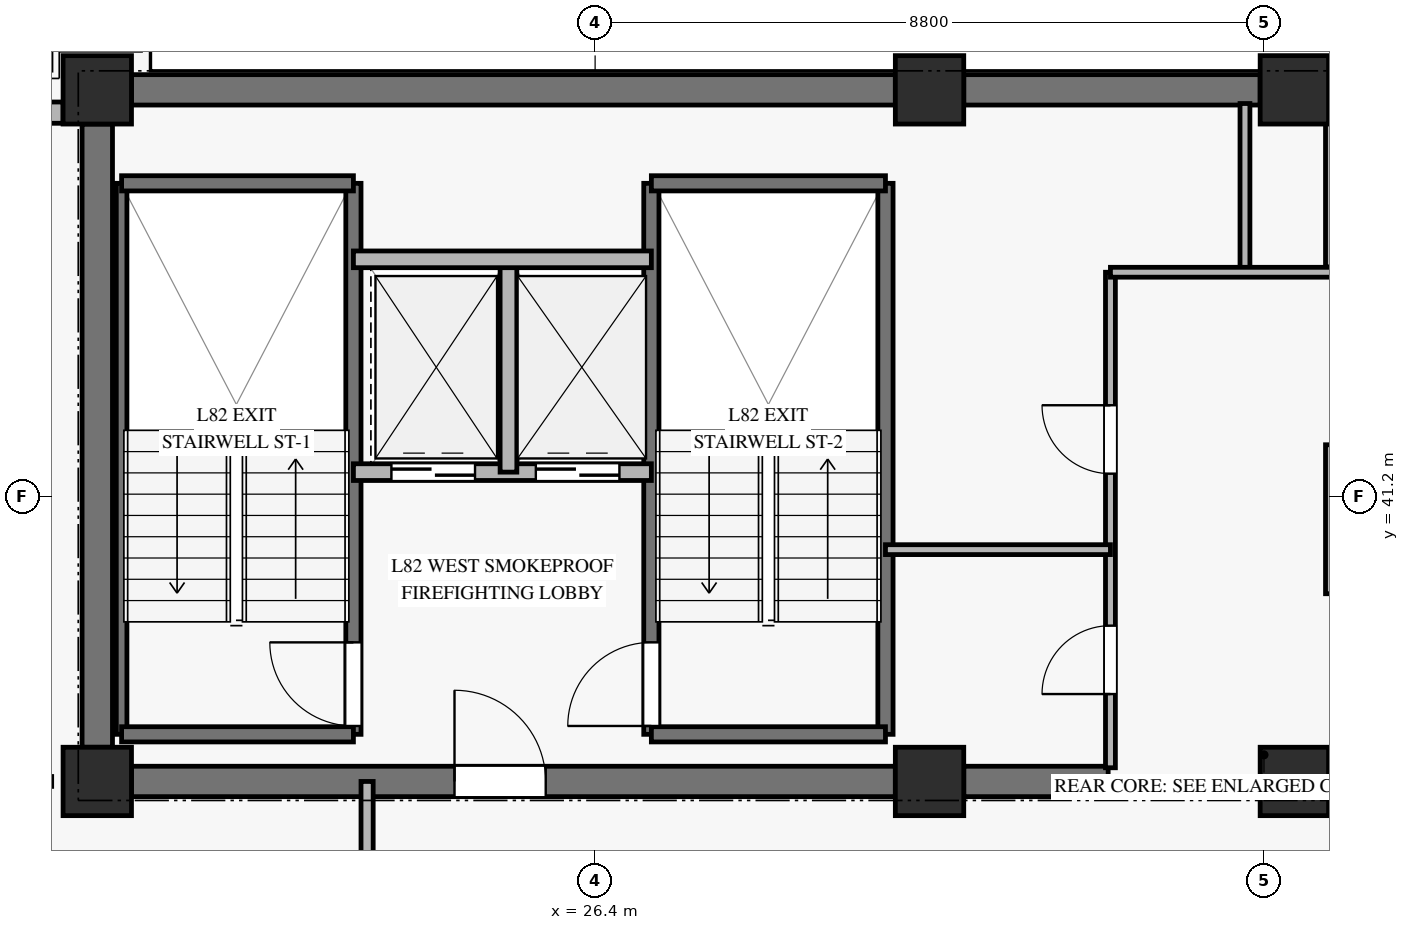
"""IFC4 building model, lengths in metres.
Left out: names, types, materials, properties, quantities, classifications, styles, units other than length and angle.
Written with IfcOpenShell. Run it as: python <this file> out.ifc"""

import sys

from ifc_helpers import new_model, si_unit, direction, frame, frame_2d, origin, origin_2d, place, context, subcontext, project, spatial, rectangle, extrude, source, transform, mapped, element, fill, save


model = new_model("IFC4")
c1 = context("Model", 3, precision=1e-05, world=origin(), true_north=direction((0.0, 1.0)))
c2 = subcontext(c1, "Body", "Model", "MODEL_VIEW")
j1 = project(units=[si_unit("LENGTHUNIT", "METRE"), si_unit("PLANEANGLEUNIT", "RADIAN")], contexts=[c1])
p1 = place(None, origin())
s1 = spatial("IfcSite", under=j1, at=p1, CompositionType="ELEMENT")
p2 = place(p1, origin())
s2 = spatial("IfcBuilding", under=s1, at=p2, CompositionType="ELEMENT")
p3 = place(p2, frame((0.0, 0.0, 317.6)))
s3 = spatial("IfcBuildingStorey", under=s2, at=p3, CompositionType="ELEMENT", Elevation=317.6)
m1 = source(origin(), c2, "Body", "SweptSolid", [
    extrude(rectangle(XDim=0.9, YDim=0.9, at=origin_2d()), origin(), (0.0, 0.0, 1.0), 3.185),
])
for number, where, z_axis, x_axis in (
    (1, (19.85, 37.45, 0.0), (0.0, 0.0, 1.0), (1.0, 0.0, 0.0)),
    (2, (19.85, 46.55, 0.0), (0.0, 0.0, 1.0), (1.0, 0.0, 0.0)),
    (3, (30.8, 37.45, 0.0), (0.0, 0.0, 1.0), (1.0, 0.0, 0.0)),
    (4, (30.8, 46.55, 0.0), (0.0, 0.0, 1.0), (1.0, 0.0, 0.0)),
    (5, (35.6, 37.45, 0.0), (0.0, 0.0, 1.0), (1.0, 0.0, 0.0)),
    (6, (35.6, 46.55, 0.0), (0.0, 0.0, 1.0), (1.0, 0.0, 0.0)),
):
    element("IfcColumn", number, at=place(p3, frame(where, z_axis=z_axis, x_axis=x_axis)), inside=s3, PredefinedType="PILASTER", context=c2, shape_type="MappedRepresentation", body=[
        mapped(m1, transform((0.0, 0.0, 0.0), x_axis=(1.0, 0.0, 0.0), y_axis=(0.0, 1.0, 0.0), z_axis=(0.0, 0.0, 1.0), scale=1.0)),
    ])
p4 = place(p3, frame((20.3, 46.55, 0.0), z_axis=(0.0, 0.0, 1.0), x_axis=(1.0, 0.0, 0.0)))
e7 = element("IfcWall", 7, at=p4, inside=s3, PredefinedType="SHEAR", context=c2, shape_type="SweptSolid", body=[
    extrude(rectangle(XDim=10.05, YDim=0.4, at=frame_2d((5.025, 0.0))), origin(), (0.0, 0.0, 1.0), 3.185),
])
p5 = place(p3, frame((31.25, 46.55, 0.0), z_axis=(0.0, 0.0, 1.0), x_axis=(1.0, 0.0, 0.0)))
e8 = element("IfcWall", 8, at=p5, inside=s3, PredefinedType="SHEAR", context=c2, shape_type="SweptSolid", body=[
    extrude(rectangle(XDim=3.9, YDim=0.4, at=frame_2d((1.95, 0.0))), origin(), (0.0, 0.0, 1.0), 3.185),
])
p6 = place(p3, frame((36.05, 46.55, 0.0), z_axis=(0.0, 0.0, 1.0), x_axis=(1.0, 0.0, 0.0)))
e9 = element("IfcWall", 9, at=p6, inside=s3, PredefinedType="SHEAR", context=c2, shape_type="SweptSolid", body=[
    extrude(rectangle(XDim=7.8, YDim=0.4, at=frame_2d((3.9, 0.0))), origin(), (0.0, 0.0, 1.0), 3.185),
])
p7 = place(p3, frame((20.3, 37.45, 0.0), z_axis=(0.0, 0.0, 1.0), x_axis=(1.0, 0.0, 0.0)))
e10 = element("IfcWall", 10, at=p7, inside=s3, PredefinedType="SHEAR", context=c2, shape_type="SweptSolid", body=[
    extrude(rectangle(XDim=10.05, YDim=0.4, at=frame_2d((5.025, 0.0))), origin(), (0.0, 0.0, 1.0), 3.185),
])
p8 = place(p7, frame((4.25, 0.0, 0.0)))
e11 = element("IfcOpeningElement", 11, at=p8, cuts=e10, PredefinedType="OPENING", context=c2, shape_type="SweptSolid", body=[
    extrude(rectangle(XDim=1.2, YDim=2.15, at=frame_2d((0.6, 1.075))), frame((0.0, 0.21, 0.0), z_axis=(0.0, -1.0, 0.0), x_axis=(1.0, 0.0, 0.0)), (0.0, 0.0, 1.0), 0.42),
])
p9 = place(p3, frame((31.25, 37.45, 0.0), z_axis=(0.0, 0.0, 1.0), x_axis=(1.0, 0.0, 0.0)))
e12 = element("IfcWall", 12, at=p9, inside=s3, PredefinedType="SHEAR", context=c2, shape_type="SweptSolid", body=[
    extrude(rectangle(XDim=1.9, YDim=0.4, at=frame_2d((0.95, 0.0))), origin(), (0.0, 0.0, 1.0), 3.185),
])
p10 = place(p3, frame((36.05, 37.45, 0.0), z_axis=(0.0, 0.0, 1.0), x_axis=(1.0, 0.0, 0.0)))
e13 = element("IfcWall", 13, at=p10, inside=s3, PredefinedType="SHEAR", context=c2, shape_type="SweptSolid", body=[
    extrude(rectangle(XDim=7.8, YDim=0.4, at=frame_2d((3.9, 0.0))), origin(), (0.0, 0.0, 1.0), 3.185),
])
p11 = place(p3, frame((19.85, 37.9, 0.0), z_axis=(0.0, 0.0, 1.0), x_axis=(0.0, 1.0, 0.0)))
e14 = element("IfcWall", 14, at=p11, inside=s3, PredefinedType="SHEAR", context=c2, shape_type="SweptSolid", body=[
    extrude(rectangle(XDim=8.2, YDim=0.4, at=frame_2d((4.1, 0.0))), origin(), (0.0, 0.0, 1.0), 3.185),
])
p12 = place(p3, frame((13.393, 46.25, 0.0), z_axis=(0.0, 0.0, 1.0), x_axis=(1.0, 0.0, 0.0)))
e15 = element("IfcWall", 15, at=p12, inside=s3, PredefinedType="SOLIDWALL", context=c2, shape_type="SweptSolid", body=[
    extrude(rectangle(XDim=6.007, YDim=0.28, at=frame_2d((3.003, 0.0))), origin(), (0.0, 0.0, 1.0), 2.815),
])
p13 = place(p12, frame((2.203, 0.0, 0.45)))
e16 = element("IfcOpeningElement", 16, at=p13, cuts=e15, PredefinedType="OPENING", context=c2, shape_type="SweptSolid", body=[
    extrude(rectangle(XDim=1.6, YDim=2.0, at=frame_2d((0.8, 1.0))), frame((0.0, 0.15, 0.0), z_axis=(0.0, -1.0, 0.0), x_axis=(1.0, 0.0, 0.0)), (0.0, 0.0, 1.0), 0.3),
])
p14 = place(p3, frame((20.17, 38.07, 0.0), z_axis=(0.0, 0.0, 1.0), x_axis=(0.0, 1.0, 0.0)))
e17 = element("IfcWall", 17, at=p14, inside=s3, PredefinedType="SOLIDWALL", context=c2, shape_type="SweptSolid", body=[
    extrude(rectangle(XDim=7.25, YDim=0.14, at=frame_2d((3.625, 0.0))), origin(), (0.0, 0.0, 1.0), 3.4),
])
p15 = place(p3, frame((23.22, 38.07, 0.0), z_axis=(0.0, 0.0, 1.0), x_axis=(0.0, 1.0, 0.0)))
e18 = element("IfcWall", 18, at=p15, inside=s3, PredefinedType="SOLIDWALL", context=c2, shape_type="SweptSolid", body=[
    extrude(rectangle(XDim=7.25, YDim=0.2, at=frame_2d((3.625, 0.0))), origin(), (0.0, 0.0, 1.0), 3.4),
])
p16 = place(p15, frame((0.11, 0.0, 0.0)))
e19 = element("IfcOpeningElement", 19, at=p16, cuts=e18, PredefinedType="OPENING", context=c2, shape_type="SweptSolid", body=[
    extrude(rectangle(XDim=1.1, YDim=2.15, at=frame_2d((0.55, 1.075))), frame((0.0, 0.11, 0.0), z_axis=(0.0, -1.0, 0.0), x_axis=(1.0, 0.0, 0.0)), (0.0, 0.0, 1.0), 0.22),
])
for number, where, z_axis, x_axis in (
    (20, (20.17, 45.32, 0.0), (0.0, 0.0, 1.0), (1.0, 0.0, 0.0)),
    (21, (20.17, 38.07, 0.0), (0.0, 0.0, 1.0), (1.0, 0.0, 0.0)),
):
    element("IfcWall", number, at=place(p3, frame(where, z_axis=z_axis, x_axis=x_axis)), inside=s3, PredefinedType="SOLIDWALL", context=c2, shape_type="SweptSolid", body=[
        extrude(rectangle(XDim=3.05, YDim=0.2, at=frame_2d((1.525, 0.0))), origin(), (0.0, 0.0, 1.0), 3.4),
    ])
p17 = place(p3, frame((27.14, 38.07, 0.0), z_axis=(0.0, 0.0, 1.0), x_axis=(0.0, 1.0, 0.0)))
e22 = element("IfcWall", 22, at=p17, inside=s3, PredefinedType="SOLIDWALL", context=c2, shape_type="SweptSolid", body=[
    extrude(rectangle(XDim=7.25, YDim=0.2, at=frame_2d((3.625, 0.0))), origin(), (0.0, 0.0, 1.0), 3.4),
])
p18 = place(p17, frame((0.11, 0.0, 0.0)))
e23 = element("IfcOpeningElement", 23, at=p18, cuts=e22, PredefinedType="OPENING", context=c2, shape_type="SweptSolid", body=[
    extrude(rectangle(XDim=1.1, YDim=2.15, at=frame_2d((0.55, 1.075))), frame((0.0, 0.11, 0.0), z_axis=(0.0, -1.0, 0.0), x_axis=(1.0, 0.0, 0.0)), (0.0, 0.0, 1.0), 0.22),
])
p19 = place(p3, frame((30.22, 38.07, 0.0), z_axis=(0.0, 0.0, 1.0), x_axis=(0.0, 1.0, 0.0)))
e24 = element("IfcWall", 24, at=p19, inside=s3, PredefinedType="SOLIDWALL", context=c2, shape_type="SweptSolid", body=[
    extrude(rectangle(XDim=7.25, YDim=0.2, at=frame_2d((3.625, 0.0))), origin(), (0.0, 0.0, 1.0), 3.4),
])
for number, where, z_axis, x_axis in (
    (25, (27.14, 45.32, 0.0), (0.0, 0.0, 1.0), (1.0, 0.0, 0.0)),
    (26, (27.14, 38.07, 0.0), (0.0, 0.0, 1.0), (1.0, 0.0, 0.0)),
):
    element("IfcWall", number, at=place(p3, frame(where, z_axis=z_axis, x_axis=x_axis)), inside=s3, PredefinedType="SOLIDWALL", context=c2, shape_type="SweptSolid", body=[
        extrude(rectangle(XDim=3.08, YDim=0.2, at=frame_2d((1.54, 0.0))), origin(), (0.0, 0.0, 1.0), 3.4),
    ])
p20 = place(p3, frame((23.22, 41.52, 0.0), z_axis=(0.0, 0.0, 1.0), x_axis=(1.0, 0.0, 0.0)))
e27 = element("IfcWall", 27, at=p20, inside=s3, PredefinedType="SOLIDWALL", context=c2, shape_type="SweptSolid", body=[
    extrude(rectangle(XDim=3.92, YDim=0.22, at=frame_2d((1.96, 0.0))), origin(), (0.0, 0.0, 1.0), 3.185),
])
p21 = place(p20, frame((0.5, 0.0, 0.0)))
e28 = element("IfcOpeningElement", 28, at=p21, cuts=e27, PredefinedType="OPENING", context=c2, shape_type="SweptSolid", body=[
    extrude(rectangle(XDim=1.1, YDim=2.2, at=frame_2d((0.55, 1.1))), frame((0.0, 0.12, 0.0), z_axis=(0.0, -1.0, 0.0), x_axis=(1.0, 0.0, 0.0)), (0.0, 0.0, 1.0), 0.24),
])
p22 = place(p20, frame((2.4, 0.0, 0.0)))
e29 = element("IfcOpeningElement", 29, at=p22, cuts=e27, PredefinedType="OPENING", context=c2, shape_type="SweptSolid", body=[
    extrude(rectangle(XDim=1.1, YDim=2.2, at=frame_2d((0.55, 1.1))), frame((0.0, 0.12, 0.0), z_axis=(0.0, -1.0, 0.0), x_axis=(1.0, 0.0, 0.0)), (0.0, 0.0, 1.0), 0.24),
])
p23 = place(p3, frame((25.26, 41.52, 0.0), z_axis=(0.0, 0.0, 1.0), x_axis=(0.0, 1.0, 0.0)))
e30 = element("IfcWall", 30, at=p23, inside=s3, PredefinedType="SOLIDWALL", context=c2, shape_type="SweptSolid", body=[
    extrude(rectangle(XDim=2.8, YDim=0.22, at=frame_2d((1.4, 0.0))), origin(), (0.0, 0.0, 1.0), 3.185),
])
p24 = place(p3, frame((23.22, 44.32, 0.0), z_axis=(0.0, 0.0, 1.0), x_axis=(1.0, 0.0, 0.0)))
e31 = element("IfcWall", 31, at=p24, inside=s3, PredefinedType="SOLIDWALL", context=c2, shape_type="SweptSolid", body=[
    extrude(rectangle(XDim=3.92, YDim=0.22, at=frame_2d((1.96, 0.0))), origin(), (0.0, 0.0, 1.0), 3.185),
])
p25 = place(p3, frame((36.12, 39.92, 0.0), z_axis=(0.0, 0.0, 1.0), x_axis=(0.0, 1.0, 0.0)))
e32 = element("IfcWall", 32, at=p25, inside=s3, PredefinedType="SOLIDWALL", context=c2, shape_type="SweptSolid", body=[
    extrude(rectangle(XDim=1.96, YDim=0.22, at=frame_2d((0.98, 0.0))), origin(), (0.0, 0.0, 1.0), 3.185),
])
p26 = place(p3, frame((36.12, 44.22, 0.0), z_axis=(0.0, 0.0, 1.0), x_axis=(0.0, 1.0, 0.0)))
e33 = element("IfcWall", 33, at=p26, inside=s3, PredefinedType="SOLIDWALL", context=c2, shape_type="SweptSolid", body=[
    extrude(rectangle(XDim=2.15, YDim=0.22, at=frame_2d((1.075, 0.0))), origin(), (0.0, 0.0, 1.0), 3.185),
])
p27 = place(p3, frame((33.18, 37.63, 0.0), z_axis=(0.0, 0.0, 1.0), x_axis=(0.0, 1.0, 0.0)))
e34 = element("IfcWall", 34, at=p27, inside=s3, PredefinedType="PARTITIONING", context=c2, shape_type="SweptSolid", body=[
    extrude(rectangle(XDim=6.52, YDim=0.13, at=frame_2d((3.26, 0.0))), origin(), (0.0, 0.0, 1.0), 2.27),
])
p28 = place(p27, frame((0.97, 0.0, 0.0)))
e35 = element("IfcOpeningElement", 35, at=p28, cuts=e34, PredefinedType="OPENING", context=c2, shape_type="SweptSolid", body=[
    extrude(rectangle(XDim=0.9, YDim=2.1, at=frame_2d((0.45, 1.05))), frame((0.0, 0.075, 0.0), z_axis=(0.0, -1.0, 0.0), x_axis=(1.0, 0.0, 0.0)), (0.0, 0.0, 1.0), 0.15),
])
p29 = place(p27, frame((3.87, 0.0, 0.0)))
e36 = element("IfcOpeningElement", 36, at=p29, cuts=e34, PredefinedType="OPENING", context=c2, shape_type="SweptSolid", body=[
    extrude(rectangle(XDim=0.9, YDim=2.1, at=frame_2d((0.45, 1.05))), frame((0.0, 0.075, 0.0), z_axis=(0.0, -1.0, 0.0), x_axis=(1.0, 0.0, 0.0)), (0.0, 0.0, 1.0), 0.15),
])
p30 = place(p3, frame((34.95, 44.15, 0.0), z_axis=(0.0, 0.0, 1.0), x_axis=(0.0, 1.0, 0.0)))
e37 = element("IfcWall", 37, at=p30, inside=s3, PredefinedType="PARTITIONING", context=c2, shape_type="SweptSolid", body=[
    extrude(rectangle(XDim=2.22, YDim=0.13, at=frame_2d((1.11, 0.0))), origin(), (0.0, 0.0, 1.0), 3.185),
])
p31 = place(p3, frame((33.18, 44.15, 0.0), z_axis=(0.0, 0.0, 1.0), x_axis=(1.0, 0.0, 0.0)))
e38 = element("IfcWall", 38, at=p31, inside=s3, PredefinedType="PARTITIONING", context=c2, shape_type="SweptSolid", body=[
    extrude(rectangle(XDim=2.94, YDim=0.13, at=frame_2d((1.47, 0.0))), origin(), (0.0, 0.0, 1.0), 2.47),
])
p32 = place(p3, frame((30.22, 40.5, 0.0), z_axis=(0.0, 0.0, 1.0), x_axis=(1.0, 0.0, 0.0)))
e39 = element("IfcWall", 39, at=p32, inside=s3, PredefinedType="PARTITIONING", context=c2, shape_type="SweptSolid", body=[
    extrude(rectangle(XDim=2.96, YDim=0.13, at=frame_2d((1.48, 0.0))), origin(), (0.0, 0.0, 1.0), 2.47),
])
p33 = place(p3, frame((23.4, 20.704, 0.0), z_axis=(0.0, 0.0, 1.0), x_axis=(0.0, 1.0, 0.0)))
e40 = element("IfcWall", 40, at=p33, inside=s3, PredefinedType="PARTITIONING", context=c2, shape_type="SweptSolid", body=[
    extrude(rectangle(XDim=16.746, YDim=0.16, at=frame_2d((8.373, 0.0))), origin(), (0.0, 0.0, 1.0), 2.77),
])
p34 = place(p33, frame((13.766, 0.0, 0.0)))
e41 = element("IfcOpeningElement", 41, at=p34, cuts=e40, PredefinedType="OPENING", context=c2, shape_type="SweptSolid", body=[
    extrude(rectangle(XDim=1.05, YDim=2.15, at=frame_2d((0.525, 1.075))), frame((0.0, 0.09, 0.0), z_axis=(0.0, -1.0, 0.0), x_axis=(1.0, 0.0, 0.0)), (0.0, 0.0, 1.0), 0.18),
])
m2 = source(origin(), c2, "Body", "SweptSolid", [
    extrude(rectangle(XDim=1.1, YDim=2.15, at=frame_2d((0.55, 1.075))), frame((0.0, 0.025, 0.0), z_axis=(0.0, -1.0, 0.0), x_axis=(1.0, 0.0, 0.0)), (0.0, 0.0, 1.0), 0.05),
])
p35 = place(p16, origin())
e42 = element("IfcDoor", 42, at=p35, inside=s3, OperationType="SINGLE_SWING_RIGHT", PredefinedType="DOOR", context=c2, shape_type="MappedRepresentation", body=[
    mapped(m2, transform((0.0, 0.0, 0.0), x_axis=(1.0, 0.0, 0.0), y_axis=(0.0, 1.0, 0.0), z_axis=(0.0, 0.0, 1.0), scale=1.0)),
])
fill(e19, e42)
p36 = place(p18, origin())
e43 = element("IfcDoor", 43, at=p36, inside=s3, OperationType="SINGLE_SWING_LEFT", PredefinedType="DOOR", context=c2, shape_type="MappedRepresentation", body=[
    mapped(m2, transform((0.0, 0.0, 0.0), x_axis=(1.0, 0.0, 0.0), y_axis=(0.0, 1.0, 0.0), z_axis=(0.0, 0.0, 1.0), scale=1.0)),
])
fill(e23, e43)
m3 = source(origin(), c2, "Body", "SweptSolid", [
    extrude(rectangle(XDim=1.1, YDim=2.2, at=frame_2d((0.55, 1.1))), frame((0.0, 0.025, 0.0), z_axis=(0.0, -1.0, 0.0), x_axis=(1.0, 0.0, 0.0)), (0.0, 0.0, 1.0), 0.05),
])
p37 = place(p21, origin())
e44 = element("IfcDoor", 44, at=p37, inside=s3, OperationType="SLIDING_TO_LEFT", PredefinedType="DOOR", context=c2, shape_type="MappedRepresentation", body=[
    mapped(m3, transform((0.0, 0.0, 0.0), x_axis=(1.0, 0.0, 0.0), y_axis=(0.0, 1.0, 0.0), z_axis=(0.0, 0.0, 1.0), scale=1.0)),
])
fill(e28, e44)
p38 = place(p22, origin())
e45 = element("IfcDoor", 45, at=p38, inside=s3, OperationType="SLIDING_TO_LEFT", PredefinedType="DOOR", context=c2, shape_type="MappedRepresentation", body=[
    mapped(m3, transform((0.0, 0.0, 0.0), x_axis=(1.0, 0.0, 0.0), y_axis=(0.0, 1.0, 0.0), z_axis=(0.0, 0.0, 1.0), scale=1.0)),
])
fill(e29, e45)
m4 = source(origin(), c2, "Body", "SweptSolid", [
    extrude(rectangle(XDim=1.2, YDim=2.15, at=frame_2d((0.6, 1.075))), frame((0.0, 0.025, 0.0), z_axis=(0.0, -1.0, 0.0), x_axis=(1.0, 0.0, 0.0)), (0.0, 0.0, 1.0), 0.05),
])
p39 = place(p8, origin())
e46 = element("IfcDoor", 46, at=p39, inside=s3, OperationType="SINGLE_SWING_LEFT", PredefinedType="DOOR", context=c2, shape_type="MappedRepresentation", body=[
    mapped(m4, transform((0.0, 0.0, 0.0), x_axis=(1.0, 0.0, 0.0), y_axis=(0.0, 1.0, 0.0), z_axis=(0.0, 0.0, 1.0), scale=1.0)),
])
fill(e11, e46)
m5 = source(origin(), c2, "Body", "SweptSolid", [
    extrude(rectangle(XDim=0.9, YDim=2.1, at=frame_2d((0.45, 1.05))), frame((0.0, 0.025, 0.0), z_axis=(0.0, -1.0, 0.0), x_axis=(1.0, 0.0, 0.0)), (0.0, 0.0, 1.0), 0.05),
])
p40 = place(p28, origin())
e47 = element("IfcDoor", 47, at=p40, inside=s3, OperationType="SINGLE_SWING_LEFT", PredefinedType="DOOR", context=c2, shape_type="MappedRepresentation", body=[
    mapped(m5, transform((0.0, 0.0, 0.0), x_axis=(1.0, 0.0, 0.0), y_axis=(0.0, 1.0, 0.0), z_axis=(0.0, 0.0, 1.0), scale=1.0)),
])
fill(e35, e47)
p41 = place(p29, origin())
e48 = element("IfcDoor", 48, at=p41, inside=s3, OperationType="SINGLE_SWING_RIGHT", PredefinedType="DOOR", context=c2, shape_type="MappedRepresentation", body=[
    mapped(m5, transform((0.0, 0.0, 0.0), x_axis=(1.0, 0.0, 0.0), y_axis=(0.0, 1.0, 0.0), z_axis=(0.0, 0.0, 1.0), scale=1.0)),
])
fill(e36, e48)
save(model, sys.argv[1])
